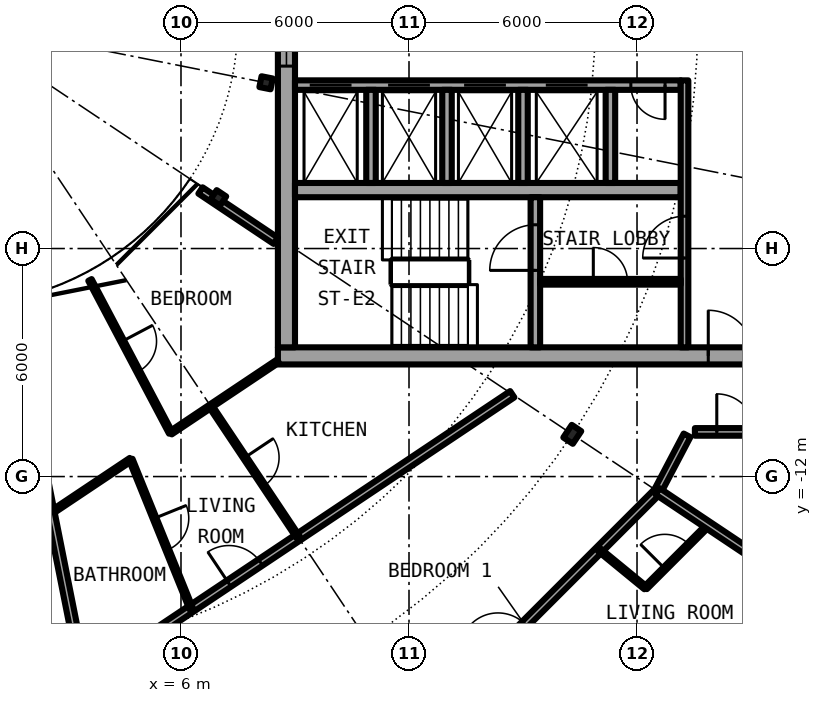
"""IFC4 building model, lengths in metres.
Left out: names, types, materials, properties, quantities, classifications, styles, units other than length and angle.
Written with IfcOpenShell. Run it as: python <this file> out.ifc"""

import sys

from ifc_helpers import new_model, si_unit, direction, frame, frame_2d, origin, origin_2d, place, context, subcontext, project, spatial, rectangle, i_section, extrude, element, fill, save


model = new_model("IFC4")
c1 = context("Model", 3, precision=1e-05, world=origin(), true_north=direction((0.0, 1.0)))
c2 = subcontext(c1, "Body", "Model", "MODEL_VIEW")
j1 = project(units=[si_unit("LENGTHUNIT", "METRE"), si_unit("PLANEANGLEUNIT", "RADIAN")], contexts=[c1])
p1 = place(None, origin())
s1 = spatial("IfcSite", under=j1, at=p1, CompositionType="ELEMENT")
p2 = place(p1, origin())
s2 = spatial("IfcBuilding", under=s1, at=p2, CompositionType="ELEMENT")
p3 = place(p2, frame((0.0, 0.0, 218.8)))
s3 = spatial("IfcBuildingStorey", under=s2, at=p3, CompositionType="ELEMENT", Elevation=218.8)
p4 = place(p3, frame((16.297, -10.889, 0.0), z_axis=(0.0, 0.0, 1.0), x_axis=(0.831469612303, -0.55557023302, 0.0)))
e1 = element("IfcColumn", 1, at=p4, inside=s3, PredefinedType="COLUMN", context=c2, shape_type="SweptSolid", body=[
    extrude(i_section(OverallWidth=0.3, OverallDepth=0.4, WebThickness=0.013, FlangeThickness=0.024, FilletRadius=0.027, at=origin_2d()), origin(), (0.0, 0.0, 1.0), 3.05),
])
for number, where, z_axis, x_axis in (
    (2, (6.984, -4.667, 0.0), (0.0, 0.0, 1.0), (0.831, -0.556, 0.0)),
    (3, (8.239, -1.639, 0.0), (0.0, 0.0, 1.0), (0.981, -0.195, 0.0)),
):
    element("IfcColumn", number, at=place(p3, frame(where, z_axis=z_axis, x_axis=x_axis)), inside=s3, PredefinedType="COLUMN", context=c2, shape_type="SweptSolid", body=[
        extrude(i_section(OverallWidth=0.3, OverallDepth=0.29, WebThickness=0.009, FlangeThickness=0.014, FilletRadius=0.027, at=origin_2d()), origin(), (0.0, 0.0, 1.0), 3.05),
    ])
p5 = place(p3, frame((19.304, -19.304, 0.0), z_axis=(0.0, 0.0, 1.0), x_axis=(0.634382322723, 0.773019449054, 0.0)))
e4 = element("IfcWall", 4, at=p5, inside=s3, PredefinedType="SOLIDWALL", context=c2, shape_type="SweptSolid", body=[
    extrude(rectangle(XDim=5.352, YDim=0.25, at=frame_2d((2.676, 0.0))), origin(), (0.0, 0.0, 1.0), 2.65),
])
p6 = place(p5, frame((0.841, 0.0, 0.0)))
e5 = element("IfcOpeningElement", 5, at=p6, cuts=e4, PredefinedType="OPENING", context=c2, shape_type="SweptSolid", body=[
    extrude(rectangle(XDim=1.0, YDim=2.2, at=frame_2d((0.5, 1.1))), frame((0.0, 0.135, 0.0), z_axis=(0.0, -1.0, 0.0), x_axis=(1.0, 0.0, 0.0)), (0.0, 0.0, 1.0), 0.27),
])
p7 = place(p5, frame((3.111, 0.0, 0.3)))
e6 = element("IfcOpeningElement", 6, at=p7, cuts=e4, PredefinedType="OPENING", context=c2, shape_type="SweptSolid", body=[
    extrude(rectangle(XDim=1.8, YDim=2.1, at=frame_2d((0.9, 1.05))), frame((0.0, 0.135, 0.0), z_axis=(0.0, -1.0, 0.0), x_axis=(1.0, 0.0, 0.0)), (0.0, 0.0, 1.0), 0.27),
])
p8 = place(p3, frame((8.55, -8.825, 0.0), z_axis=(0.0, 0.0, 1.0), x_axis=(1.0, 0.0, 0.0)))
e7 = element("IfcWall", 7, at=p8, inside=s3, PredefinedType="SHEAR", context=c2, shape_type="SweptSolid", body=[
    extrude(rectangle(XDim=13.5, YDim=0.45, at=frame_2d((6.75, 0.0))), origin(), (0.0, 0.0, 1.0), 3.05),
])
p9 = place(p8, frame((11.325, 0.0, 0.0)))
e8 = element("IfcOpeningElement", 8, at=p9, cuts=e7, PredefinedType="OPENING", context=c2, shape_type="SweptSolid", body=[
    extrude(rectangle(XDim=1.2, YDim=2.3, at=frame_2d((0.6, 1.15))), frame((0.0, 0.235, 0.0), z_axis=(0.0, -1.0, 0.0), x_axis=(1.0, 0.0, 0.0)), (0.0, 0.0, 1.0), 0.47),
])
p10 = place(p3, frame((8.775, -8.6, 0.0), z_axis=(0.0, 0.0, 1.0), x_axis=(0.0, 1.0, 0.0)))
e9 = element("IfcWall", 9, at=p10, inside=s3, PredefinedType="SHEAR", context=c2, shape_type="SweptSolid", body=[
    extrude(rectangle(XDim=17.2, YDim=0.45, at=frame_2d((8.6, 0.0))), origin(), (0.0, 0.0, 1.0), 3.05),
])
p11 = place(p10, frame((7.4, 0.0, 0.1)))
e10 = element("IfcOpeningElement", 10, at=p11, cuts=e9, PredefinedType="OPENING", context=c2, shape_type="SweptSolid", body=[
    extrude(rectangle(XDim=2.4, YDim=2.2, at=frame_2d((1.2, 1.1))), frame((0.0, 0.235, 0.0), z_axis=(0.0, -1.0, 0.0), x_axis=(1.0, 0.0, 0.0)), (0.0, 0.0, 1.0), 0.47),
])
p12 = place(p3, frame((19.15, -1.7, 0.0), z_axis=(0.0, 0.0, 1.0), x_axis=(-1.0, 0.0, 0.0)))
e11 = element("IfcWall", 11, at=p12, inside=s3, PredefinedType="SHEAR", context=c2, shape_type="SweptSolid", body=[
    extrude(rectangle(XDim=10.15, YDim=0.25, at=frame_2d((5.075, 0.0))), origin(), (0.0, 0.0, 1.0), 3.05),
])
p13 = place(p12, frame((8.663, 0.0, 0.0)))
e12 = element("IfcOpeningElement", 12, at=p13, cuts=e11, PredefinedType="OPENING", context=c2, shape_type="SweptSolid", body=[
    extrude(rectangle(XDim=1.1, YDim=2.3, at=frame_2d((0.55, 1.15))), frame((0.0, 0.135, 0.0), z_axis=(0.0, -1.0, 0.0), x_axis=(1.0, 0.0, 0.0)), (0.0, 0.0, 1.0), 0.27),
])
p14 = place(p12, frame((6.6, 0.0, 0.0)))
e13 = element("IfcOpeningElement", 13, at=p14, cuts=e11, PredefinedType="OPENING", context=c2, shape_type="SweptSolid", body=[
    extrude(rectangle(XDim=1.1, YDim=2.3, at=frame_2d((0.55, 1.15))), frame((0.0, 0.135, 0.0), z_axis=(0.0, -1.0, 0.0), x_axis=(1.0, 0.0, 0.0)), (0.0, 0.0, 1.0), 0.27),
])
p15 = place(p12, frame((4.6, 0.0, 0.0)))
e14 = element("IfcOpeningElement", 14, at=p15, cuts=e11, PredefinedType="OPENING", context=c2, shape_type="SweptSolid", body=[
    extrude(rectangle(XDim=1.1, YDim=2.3, at=frame_2d((0.55, 1.15))), frame((0.0, 0.135, 0.0), z_axis=(0.0, -1.0, 0.0), x_axis=(1.0, 0.0, 0.0)), (0.0, 0.0, 1.0), 0.27),
])
p16 = place(p12, frame((2.45, 0.0, 0.0)))
e15 = element("IfcOpeningElement", 15, at=p16, cuts=e11, PredefinedType="OPENING", context=c2, shape_type="SweptSolid", body=[
    extrude(rectangle(XDim=1.1, YDim=2.3, at=frame_2d((0.55, 1.15))), frame((0.0, 0.135, 0.0), z_axis=(0.0, -1.0, 0.0), x_axis=(1.0, 0.0, 0.0)), (0.0, 0.0, 1.0), 0.27),
])
p17 = place(p12, frame((0.413, 0.0, 0.0)))
e16 = element("IfcOpeningElement", 16, at=p17, cuts=e11, PredefinedType="OPENING", context=c2, shape_type="SweptSolid", body=[
    extrude(rectangle(XDim=0.9, YDim=2.3, at=frame_2d((0.45, 1.15))), frame((0.0, 0.135, 0.0), z_axis=(0.0, -1.0, 0.0), x_axis=(1.0, 0.0, 0.0)), (0.0, 0.0, 1.0), 0.27),
])
p18 = place(p3, frame((9.0, -4.462, 0.0), z_axis=(0.0, 0.0, 1.0), x_axis=(1.0, 0.0, 0.0)))
e17 = element("IfcWall", 17, at=p18, inside=s3, PredefinedType="SHEAR", context=c2, shape_type="SweptSolid", body=[
    extrude(rectangle(XDim=10.15, YDim=0.375, at=frame_2d((5.075, 0.0))), origin(), (0.0, 0.0, 1.0), 3.05),
])
p19 = place(p3, frame((15.325, -8.6, 0.0), z_axis=(0.0, 0.0, 1.0), x_axis=(0.0, 1.0, 0.0)))
e18 = element("IfcWall", 18, at=p19, inside=s3, PredefinedType="SHEAR", context=c2, shape_type="SweptSolid", body=[
    extrude(rectangle(XDim=3.95, YDim=0.25, at=frame_2d((1.975, 0.0))), origin(), (0.0, 0.0, 1.0), 3.05),
])
p20 = place(p19, frame((2.025, 0.0, 0.0)))
e19 = element("IfcOpeningElement", 19, at=p20, cuts=e18, PredefinedType="OPENING", context=c2, shape_type="SweptSolid", body=[
    extrude(rectangle(XDim=1.2, YDim=2.3, at=frame_2d((0.6, 1.15))), frame((0.0, 0.135, 0.0), z_axis=(0.0, -1.0, 0.0), x_axis=(1.0, 0.0, 0.0)), (0.0, 0.0, 1.0), 0.27),
])
for number, where, z_axis, x_axis in (
    (20, (15.0, -1.825, 0.0), (0.0, 0.0, 1.0), (0.0, -1.0, 0.0)),
    (21, (17.3, -1.825, 0.0), (0.0, 0.0, 1.0), (0.0, -1.0, 0.0)),
):
    element("IfcWall", number, at=place(p3, frame(where, z_axis=z_axis, x_axis=x_axis)), inside=s3, PredefinedType="SOLIDWALL", context=c2, shape_type="SweptSolid", body=[
        extrude(rectangle(XDim=2.45, YDim=0.25, at=frame_2d((1.225, 0.0))), origin(), (0.0, 0.0, 1.0), 2.65),
    ])
p21 = place(p3, frame((19.25, -8.6, 0.0), z_axis=(0.0, 0.0, 1.0), x_axis=(0.0, 1.0, 0.0)))
e22 = element("IfcWall", 22, at=p21, inside=s3, PredefinedType="SOLIDWALL", context=c2, shape_type="SweptSolid", body=[
    extrude(rectangle(XDim=7.025, YDim=0.2, at=frame_2d((3.513, 0.0))), origin(), (0.0, 0.0, 1.0), 2.65),
])
p22 = place(p21, frame((2.35, 0.0, 0.0)))
e23 = element("IfcOpeningElement", 23, at=p22, cuts=e22, PredefinedType="OPENING", context=c2, shape_type="SweptSolid", body=[
    extrude(rectangle(XDim=1.1, YDim=2.3, at=frame_2d((0.55, 1.15))), frame((0.0, 0.11, 0.0), z_axis=(0.0, -1.0, 0.0), x_axis=(1.0, 0.0, 0.0)), (0.0, 0.0, 1.0), 0.22),
])
for number, where, z_axis, x_axis in (
    (24, (11.0, -1.825, 0.0), (0.0, 0.0, 1.0), (0.0, -1.0, 0.0)),
    (25, (13.0, -1.825, 0.0), (0.0, 0.0, 1.0), (0.0, -1.0, 0.0)),
):
    element("IfcWall", number, at=place(p3, frame(where, z_axis=z_axis, x_axis=x_axis)), inside=s3, PredefinedType="SOLIDWALL", context=c2, shape_type="SweptSolid", body=[
        extrude(rectangle(XDim=2.45, YDim=0.25, at=frame_2d((1.225, 0.0))), origin(), (0.0, 0.0, 1.0), 2.65),
    ])
p23 = place(p3, frame((15.45, -6.875, 0.0), z_axis=(0.0, 0.0, 1.0), x_axis=(1.0, 0.0, 0.0)))
e26 = element("IfcWall", 26, at=p23, inside=s3, PredefinedType="PARTITIONING", context=c2, shape_type="SweptSolid", body=[
    extrude(rectangle(XDim=3.7, YDim=0.15, at=frame_2d((1.85, 0.0))), origin(), (0.0, 0.0, 1.0), 2.65),
])
p24 = place(p23, frame((1.4, 0.0, 0.0)))
e27 = element("IfcOpeningElement", 27, at=p24, cuts=e26, PredefinedType="OPENING", context=c2, shape_type="SweptSolid", body=[
    extrude(rectangle(XDim=0.9, YDim=2.3, at=frame_2d((0.45, 1.15))), frame((0.0, 0.085, 0.0), z_axis=(0.0, -1.0, 0.0), x_axis=(1.0, 0.0, 0.0)), (0.0, 0.0, 1.0), 0.17),
])
p25 = place(p3, frame((18.224, -14.927, 0.0), z_axis=(0.0, 0.0, 1.0), x_axis=(0.706897299114, 0.707316201218, 0.0)))
e28 = element("IfcWall", 28, at=p25, inside=s3, PredefinedType="PARTITIONING", context=c2, shape_type="SweptSolid", body=[
    extrude(rectangle(XDim=2.331, YDim=0.1, at=frame_2d((1.166, 0.0))), origin(), (0.0, 0.0, 1.0), 2.65),
])
p26 = place(p25, frame((0.716, 0.0, 0.0)))
e29 = element("IfcOpeningElement", 29, at=p26, cuts=e28, PredefinedType="OPENING", context=c2, shape_type="SweptSolid", body=[
    extrude(rectangle(XDim=0.9, YDim=2.3, at=frame_2d((0.45, 1.15))), frame((0.0, 0.06, 0.0), z_axis=(0.0, -1.0, 0.0), x_axis=(1.0, 0.0, 0.0)), (0.0, 0.0, 1.0), 0.12),
])
p27 = place(p3, frame((18.542, -12.389, 0.0), z_axis=(0.0, 0.0, 1.0), x_axis=(0.465359652486, 0.885121683068, 0.0)))
e30 = element("IfcWall", 30, at=p27, inside=s3, PredefinedType="PARTITIONING", context=c2, shape_type="SweptSolid", body=[
    extrude(rectangle(XDim=1.665, YDim=0.2, at=frame_2d((0.833, 0.0))), origin(), (0.0, 0.0, 1.0), 2.65),
])
p28 = place(p3, frame((12.389, -18.542, 0.0), z_axis=(0.0, 0.0, 1.0), x_axis=(0.707106781187, 0.707106781187, 0.0)))
e31 = element("IfcWall", 31, at=p28, inside=s3, PredefinedType="PARTITIONING", context=c2, shape_type="SweptSolid", body=[
    extrude(rectangle(XDim=8.702, YDim=0.2, at=frame_2d((4.351, 0.0))), origin(), (0.0, 0.0, 1.0), 2.65),
])
p29 = place(p28, frame((2.763, 0.0, 0.0)))
e32 = element("IfcOpeningElement", 32, at=p29, cuts=e31, PredefinedType="OPENING", context=c2, shape_type="SweptSolid", body=[
    extrude(rectangle(XDim=1.0, YDim=2.3, at=frame_2d((0.5, 1.15))), frame((0.0, 0.11, 0.0), z_axis=(0.0, -1.0, 0.0), x_axis=(1.0, 0.0, 0.0)), (0.0, 0.0, 1.0), 0.22),
])
p30 = place(p3, frame((3.451, -17.361, 0.0), z_axis=(0.0, 0.0, 1.0), x_axis=(0.831492679744, 0.555535708603, 0.0)))
e33 = element("IfcWall", 33, at=p30, inside=s3, PredefinedType="PARTITIONING", context=c2, shape_type="SweptSolid", body=[
    extrude(rectangle(XDim=13.549, YDim=0.2, at=frame_2d((6.775, 0.0))), origin(), (0.0, 0.0, 1.0), 2.65),
])
p31 = place(p30, frame((4.583, 0.0, 0.0)))
e34 = element("IfcOpeningElement", 34, at=p31, cuts=e33, PredefinedType="OPENING", context=c2, shape_type="SweptSolid", body=[
    extrude(rectangle(XDim=1.0, YDim=2.3, at=frame_2d((0.5, 1.15))), frame((0.0, 0.11, 0.0), z_axis=(0.0, -1.0, 0.0), x_axis=(1.0, 0.0, 0.0)), (0.0, 0.0, 1.0), 0.22),
])
p32 = place(p3, frame((2.578, -12.955, 0.0), z_axis=(0.0, 0.0, 1.0), x_axis=(0.831440395268, 0.555613956912, 0.0)))
e35 = element("IfcWall", 35, at=p32, inside=s3, PredefinedType="PARTITIONING", context=c2, shape_type="SweptSolid", body=[
    extrude(rectangle(XDim=2.527, YDim=0.1, at=frame_2d((1.264, 0.0))), origin(), (0.0, 0.0, 1.0), 2.65),
])
p33 = place(p3, frame((5.73, -10.849, 0.0), z_axis=(0.0, 0.0, 1.0), x_axis=(0.83129689803, 0.555828631257, 0.0)))
e36 = element("IfcWall", 36, at=p33, inside=s3, PredefinedType="PARTITIONING", context=c2, shape_type="SweptSolid", body=[
    extrude(rectangle(XDim=3.394, YDim=0.1, at=frame_2d((1.697, 0.0))), origin(), (0.0, 0.0, 1.0), 2.65),
])
p34 = place(p3, frame((19.523, -10.825, 0.0), z_axis=(0.0, 0.0, 1.0), x_axis=(1.0, 0.0, 0.0)))
e37 = element("IfcWall", 37, at=p34, inside=s3, PredefinedType="PARTITIONING", context=c2, shape_type="SweptSolid", body=[
    extrude(rectangle(XDim=2.152, YDim=0.2, at=frame_2d((1.076, 0.0))), origin(), (0.0, 0.0, 1.0), 2.65),
])
p35 = place(p34, frame((0.576, 0.0, 0.0)))
e38 = element("IfcOpeningElement", 38, at=p35, cuts=e37, PredefinedType="OPENING", context=c2, shape_type="SweptSolid", body=[
    extrude(rectangle(XDim=1.0, YDim=2.3, at=frame_2d((0.5, 1.15))), frame((0.0, 0.11, 0.0), z_axis=(0.0, -1.0, 0.0), x_axis=(1.0, 0.0, 0.0)), (0.0, 0.0, 1.0), 0.22),
])
p36 = place(p3, frame((6.513, -4.472, 0.0), z_axis=(0.0, 0.0, 1.0), x_axis=(0.831403409976, -0.555669299026, 0.0)))
e39 = element("IfcWall", 39, at=p36, inside=s3, PredefinedType="PARTITIONING", context=c2, shape_type="SweptSolid", body=[
    extrude(rectangle(XDim=2.383, YDim=0.2, at=frame_2d((1.191, 0.0))), origin(), (0.0, 0.0, 1.0), 2.65),
])
p37 = place(p3, frame((1.667, -8.381, 0.0), z_axis=(0.0, 0.0, 1.0), x_axis=(0.195074954737, -0.98078833702, 0.0)))
e40 = element("IfcWall", 40, at=p37, inside=s3, PredefinedType="PARTITIONING", context=c2, shape_type="SweptSolid", body=[
    extrude(rectangle(XDim=9.155, YDim=0.2, at=frame_2d((4.577, 0.0))), origin(), (0.0, 0.0, 1.0), 2.65),
])
p38 = place(p3, frame((3.605, -6.827, 0.0), z_axis=(0.0, 0.0, 1.0), x_axis=(0.466962677975, -0.884277025246, 0.0)))
e41 = element("IfcWall", 41, at=p38, inside=s3, PredefinedType="PARTITIONING", context=c2, shape_type="SweptSolid", body=[
    extrude(rectangle(XDim=4.549, YDim=0.1, at=frame_2d((2.274, 0.0))), origin(), (0.0, 0.0, 1.0), 2.65),
])
p39 = place(p38, frame((1.824, 0.0, 0.0)))
e42 = element("IfcOpeningElement", 42, at=p39, cuts=e41, PredefinedType="OPENING", context=c2, shape_type="SweptSolid", body=[
    extrude(rectangle(XDim=0.9, YDim=2.3, at=frame_2d((0.45, 1.15))), frame((0.0, 0.06, 0.0), z_axis=(0.0, -1.0, 0.0), x_axis=(1.0, 0.0, 0.0)), (0.0, 0.0, 1.0), 0.12),
])
p40 = place(p3, frame((4.678, -11.551, 0.0), z_axis=(0.0, 0.0, 1.0), x_axis=(0.375509828455, -0.926818411952, 0.0)))
e43 = element("IfcWall", 43, at=p40, inside=s3, PredefinedType="PARTITIONING", context=c2, shape_type="SweptSolid", body=[
    extrude(rectangle(XDim=4.237, YDim=0.1, at=frame_2d((2.119, 0.0))), origin(), (0.0, 0.0, 1.0), 2.65),
])
p41 = place(p40, frame((1.669, 0.0, 0.0)))
e44 = element("IfcOpeningElement", 44, at=p41, cuts=e43, PredefinedType="OPENING", context=c2, shape_type="SweptSolid", body=[
    extrude(rectangle(XDim=0.9, YDim=2.3, at=frame_2d((0.45, 1.15))), frame((0.0, 0.06, 0.0), z_axis=(0.0, -1.0, 0.0), x_axis=(1.0, 0.0, 0.0)), (0.0, 0.0, 1.0), 0.12),
])
p42 = place(p3, frame((6.779, -10.148, 0.0), z_axis=(0.0, 0.0, 1.0), x_axis=(0.555528237031, -0.831497671591, 0.0)))
e45 = element("IfcWall", 45, at=p42, inside=s3, PredefinedType="PARTITIONING", context=c2, shape_type="SweptSolid", body=[
    extrude(rectangle(XDim=4.149, YDim=0.1, at=frame_2d((2.075, 0.0))), origin(), (0.0, 0.0, 1.0), 2.65),
])
p43 = place(p42, frame((1.624, 0.0, 0.0)))
e46 = element("IfcOpeningElement", 46, at=p43, cuts=e45, PredefinedType="OPENING", context=c2, shape_type="SweptSolid", body=[
    extrude(rectangle(XDim=0.9, YDim=2.3, at=frame_2d((0.45, 1.15))), frame((0.0, 0.06, 0.0), z_axis=(0.0, -1.0, 0.0), x_axis=(1.0, 0.0, 0.0)), (0.0, 0.0, 1.0), 0.12),
])
p44 = place(p3, frame((18.542, -12.389, 0.0), z_axis=(0.0, 0.0, 1.0), x_axis=(0.831387096605, -0.55569370664, 0.0)))
e47 = element("IfcWall", 47, at=p44, inside=s3, PredefinedType="PARTITIONING", context=c2, shape_type="SweptSolid", body=[
    extrude(rectangle(XDim=4.875, YDim=0.2, at=frame_2d((2.438, 0.0))), origin(), (0.0, 0.0, 1.0), 2.65),
])
p45 = place(p3, frame((17.004, -13.927, 0.0), z_axis=(0.0, 0.0, 1.0), x_axis=(0.773446828454, -0.633861186344, 0.0)))
e48 = element("IfcWall", 48, at=p45, inside=s3, PredefinedType="PARTITIONING", context=c2, shape_type="SweptSolid", body=[
    extrude(rectangle(XDim=1.578, YDim=0.1, at=frame_2d((0.789, 0.0))), origin(), (0.0, 0.0, 1.0), 2.65),
])
p46 = place(p13, origin())
e49 = element("IfcDoor", 49, at=p46, inside=s3, OperationType="DOUBLE_DOOR_SLIDING", PredefinedType="DOOR", context=c2, shape_type="SweptSolid", body=[
    extrude(rectangle(XDim=1.1, YDim=2.3, at=frame_2d((0.55, 1.15))), frame((0.0, 0.025, 0.0), z_axis=(0.0, -1.0, 0.0), x_axis=(1.0, 0.0, 0.0)), (0.0, 0.0, 1.0), 0.05),
])
fill(e12, e49)
p47 = place(p14, origin())
e50 = element("IfcDoor", 50, at=p47, inside=s3, OperationType="DOUBLE_DOOR_SLIDING", PredefinedType="DOOR", context=c2, shape_type="SweptSolid", body=[
    extrude(rectangle(XDim=1.1, YDim=2.3, at=frame_2d((0.55, 1.15))), frame((0.0, 0.025, 0.0), z_axis=(0.0, -1.0, 0.0), x_axis=(1.0, 0.0, 0.0)), (0.0, 0.0, 1.0), 0.05),
])
fill(e13, e50)
p48 = place(p15, origin())
e51 = element("IfcDoor", 51, at=p48, inside=s3, OperationType="DOUBLE_DOOR_SLIDING", PredefinedType="DOOR", context=c2, shape_type="SweptSolid", body=[
    extrude(rectangle(XDim=1.1, YDim=2.3, at=frame_2d((0.55, 1.15))), frame((0.0, 0.025, 0.0), z_axis=(0.0, -1.0, 0.0), x_axis=(1.0, 0.0, 0.0)), (0.0, 0.0, 1.0), 0.05),
])
fill(e14, e51)
p49 = place(p16, origin())
e52 = element("IfcDoor", 52, at=p49, inside=s3, OperationType="DOUBLE_DOOR_SLIDING", PredefinedType="DOOR", context=c2, shape_type="SweptSolid", body=[
    extrude(rectangle(XDim=1.1, YDim=2.3, at=frame_2d((0.55, 1.15))), frame((0.0, 0.025, 0.0), z_axis=(0.0, -1.0, 0.0), x_axis=(1.0, 0.0, 0.0)), (0.0, 0.0, 1.0), 0.05),
])
fill(e15, e52)
p50 = place(p17, origin())
e53 = element("IfcDoor", 53, at=p50, inside=s3, OperationType="SINGLE_SWING_RIGHT", PredefinedType="DOOR", context=c2, shape_type="SweptSolid", body=[
    extrude(rectangle(XDim=0.9, YDim=2.3, at=frame_2d((0.45, 1.15))), frame((0.0, 0.025, 0.0), z_axis=(0.0, -1.0, 0.0), x_axis=(1.0, 0.0, 0.0)), (0.0, 0.0, 1.0), 0.05),
])
fill(e16, e53)
p51 = place(p24, origin())
e54 = element("IfcDoor", 54, at=p51, inside=s3, OperationType="SINGLE_SWING_LEFT", PredefinedType="DOOR", context=c2, shape_type="SweptSolid", body=[
    extrude(rectangle(XDim=0.9, YDim=2.3, at=frame_2d((0.45, 1.15))), frame((0.0, 0.025, 0.0), z_axis=(0.0, -1.0, 0.0), x_axis=(1.0, 0.0, 0.0)), (0.0, 0.0, 1.0), 0.05),
])
fill(e27, e54)
p52 = place(p20, origin())
e55 = element("IfcDoor", 55, at=p52, inside=s3, OperationType="SINGLE_SWING_LEFT", PredefinedType="DOOR", context=c2, shape_type="SweptSolid", body=[
    extrude(rectangle(XDim=1.2, YDim=2.3, at=frame_2d((0.6, 1.15))), frame((0.0, 0.025, 0.0), z_axis=(0.0, -1.0, 0.0), x_axis=(1.0, 0.0, 0.0)), (0.0, 0.0, 1.0), 0.05),
])
fill(e19, e55)
p53 = place(p22, origin())
e56 = element("IfcDoor", 56, at=p53, inside=s3, OperationType="SINGLE_SWING_RIGHT", PredefinedType="DOOR", context=c2, shape_type="SweptSolid", body=[
    extrude(rectangle(XDim=1.1, YDim=2.3, at=frame_2d((0.55, 1.15))), frame((0.0, 0.025, 0.0), z_axis=(0.0, -1.0, 0.0), x_axis=(1.0, 0.0, 0.0)), (0.0, 0.0, 1.0), 0.05),
])
fill(e23, e56)
p54 = place(p9, origin())
e57 = element("IfcDoor", 57, at=p54, inside=s3, OperationType="SINGLE_SWING_LEFT", PredefinedType="DOOR", context=c2, shape_type="SweptSolid", body=[
    extrude(rectangle(XDim=1.2, YDim=2.3, at=frame_2d((0.6, 1.15))), frame((0.0, 0.025, 0.0), z_axis=(0.0, -1.0, 0.0), x_axis=(1.0, 0.0, 0.0)), (0.0, 0.0, 1.0), 0.05),
])
fill(e8, e57)
p55 = place(p11, origin())
e58 = element("IfcWindow", 58, at=p55, inside=s3, PartitioningType="SINGLE_PANEL", PredefinedType="WINDOW", context=c2, shape_type="SweptSolid", body=[
    extrude(rectangle(XDim=2.4, YDim=2.2, at=frame_2d((1.2, 1.1))), frame((0.0, 0.03, 0.0), z_axis=(0.0, -1.0, 0.0), x_axis=(1.0, 0.0, 0.0)), (0.0, 0.0, 1.0), 0.06),
])
fill(e10, e58)
p56 = place(p26, origin())
e59 = element("IfcDoor", 59, at=p56, inside=s3, OperationType="SINGLE_SWING_RIGHT", PredefinedType="DOOR", context=c2, shape_type="SweptSolid", body=[
    extrude(rectangle(XDim=0.9, YDim=2.3, at=frame_2d((0.45, 1.15))), frame((0.0, 0.025, 0.0), z_axis=(0.0, -1.0, 0.0), x_axis=(1.0, 0.0, 0.0)), (0.0, 0.0, 1.0), 0.05),
])
fill(e29, e59)
p57 = place(p31, origin())
e60 = element("IfcDoor", 60, at=p57, inside=s3, OperationType="SINGLE_SWING_LEFT", PredefinedType="DOOR", context=c2, shape_type="SweptSolid", body=[
    extrude(rectangle(XDim=1.0, YDim=2.3, at=frame_2d((0.5, 1.15))), frame((0.0, 0.025, 0.0), z_axis=(0.0, -1.0, 0.0), x_axis=(1.0, 0.0, 0.0)), (0.0, 0.0, 1.0), 0.05),
])
fill(e34, e60)
p58 = place(p41, origin())
e61 = element("IfcDoor", 61, at=p58, inside=s3, OperationType="SINGLE_SWING_RIGHT", PredefinedType="DOOR", context=c2, shape_type="SweptSolid", body=[
    extrude(rectangle(XDim=0.9, YDim=2.3, at=frame_2d((0.45, 1.15))), frame((0.0, 0.025, 0.0), z_axis=(0.0, -1.0, 0.0), x_axis=(1.0, 0.0, 0.0)), (0.0, 0.0, 1.0), 0.05),
])
fill(e44, e61)
p59 = place(p43, origin())
e62 = element("IfcDoor", 62, at=p59, inside=s3, OperationType="SINGLE_SWING_LEFT", PredefinedType="DOOR", context=c2, shape_type="SweptSolid", body=[
    extrude(rectangle(XDim=0.9, YDim=2.3, at=frame_2d((0.45, 1.15))), frame((0.0, 0.025, 0.0), z_axis=(0.0, -1.0, 0.0), x_axis=(1.0, 0.0, 0.0)), (0.0, 0.0, 1.0), 0.05),
])
fill(e46, e62)
p60 = place(p39, origin())
e63 = element("IfcDoor", 63, at=p60, inside=s3, OperationType="SINGLE_SWING_LEFT", PredefinedType="DOOR", context=c2, shape_type="SweptSolid", body=[
    extrude(rectangle(XDim=0.9, YDim=2.3, at=frame_2d((0.45, 1.15))), frame((0.0, 0.025, 0.0), z_axis=(0.0, -1.0, 0.0), x_axis=(1.0, 0.0, 0.0)), (0.0, 0.0, 1.0), 0.05),
])
fill(e42, e63)
p61 = place(p35, origin())
e64 = element("IfcDoor", 64, at=p61, inside=s3, OperationType="SINGLE_SWING_LEFT", PredefinedType="DOOR", context=c2, shape_type="SweptSolid", body=[
    extrude(rectangle(XDim=1.0, YDim=2.3, at=frame_2d((0.5, 1.15))), frame((0.0, 0.025, 0.0), z_axis=(0.0, -1.0, 0.0), x_axis=(1.0, 0.0, 0.0)), (0.0, 0.0, 1.0), 0.05),
])
fill(e38, e64)
save(model, sys.argv[1])
